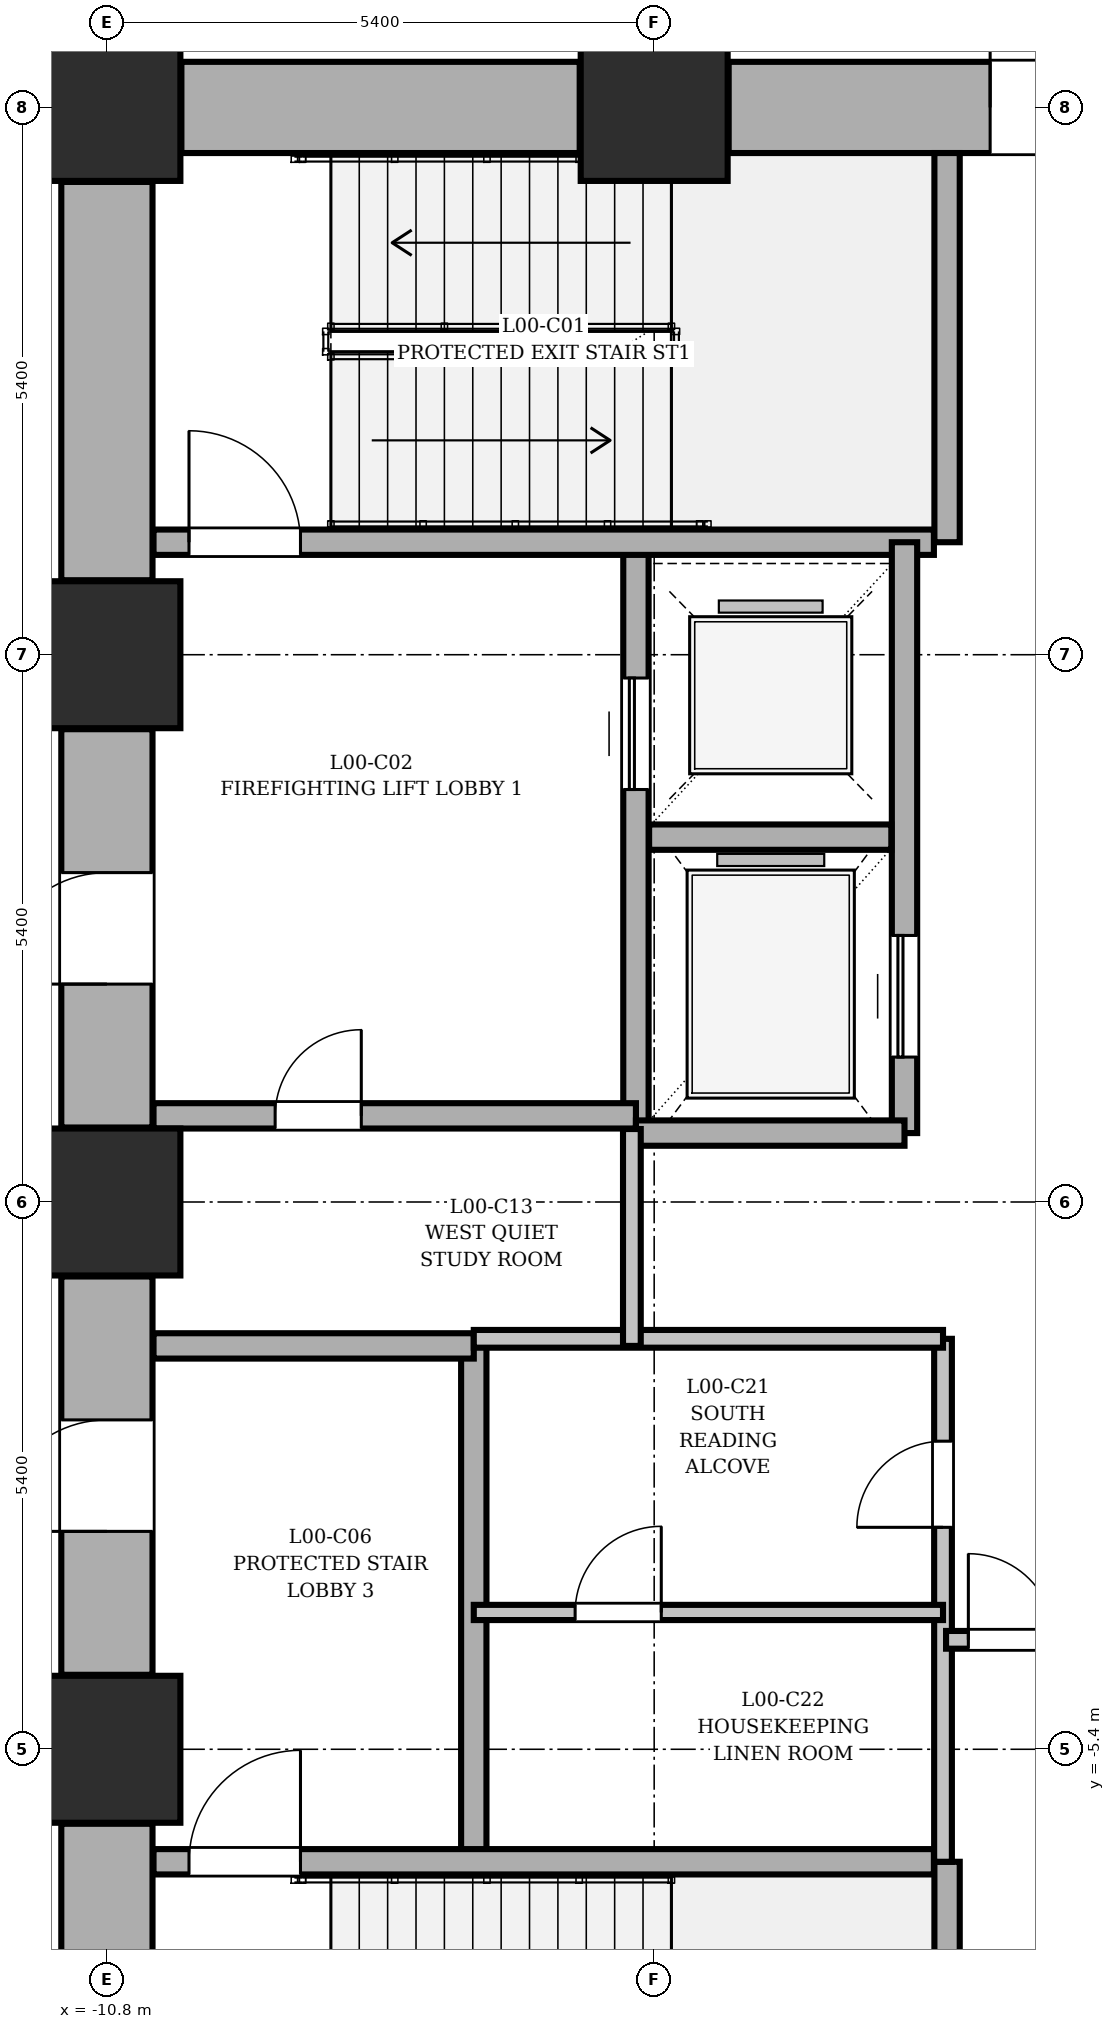
"""IFC4 building model, lengths in metres.
Left out: names, types, materials, properties, quantities, classifications, styles, units other than length and angle.
Written with IfcOpenShell. Run it as: python <this file> out.ifc"""

import sys

from ifc_helpers import new_model, si_unit, direction, frame, frame_2d, origin, origin_2d, place, context, subcontext, project, spatial, rectangle, extrude, element, fill, save


model = new_model("IFC4")
c1 = context("Model", 3, precision=1e-05, world=origin(), true_north=direction((0.0, 1.0)))
c2 = subcontext(c1, "Body", "Model", "MODEL_VIEW")
j1 = project(units=[si_unit("LENGTHUNIT", "METRE"), si_unit("PLANEANGLEUNIT", "RADIAN")], contexts=[c1])
p1 = place(None, origin())
s1 = spatial("IfcSite", under=j1, at=p1, CompositionType="ELEMENT")
p2 = place(p1, origin())
s2 = spatial("IfcBuilding", under=s1, at=p2, CompositionType="ELEMENT")
p3 = place(p2, origin())
s3 = spatial("IfcBuildingStorey", under=s2, at=p3, CompositionType="ELEMENT", Elevation=0.0)
for number, where, z_axis, x_axis in (
    (1, (-10.8, -5.4, 0.0), (0.0, 0.0, 1.0), (1.0, 0.0, 0.0)),
    (2, (-10.8, 0.0, 0.0), (0.0, 0.0, 1.0), (1.0, 0.0, 0.0)),
    (3, (-10.8, 5.4, 0.0), (0.0, 0.0, 1.0), (1.0, 0.0, 0.0)),
    (4, (-10.8, 10.8, 0.0), (0.0, 0.0, 1.0), (1.0, 0.0, 0.0)),
    (5, (-5.4, 10.8, 0.0), (0.0, 0.0, 1.0), (1.0, 0.0, 0.0)),
):
    element("IfcColumn", number, at=place(p3, frame(where, z_axis=z_axis, x_axis=x_axis)), inside=s3, PredefinedType="COLUMN", context=c2, shape_type="SweptSolid", body=[
        extrude(rectangle(XDim=1.45, YDim=1.45, at=origin_2d()), origin(), (0.0, 0.0, 1.0), 4.5),
    ])
for number, where, z_axis, x_axis in (
    (6, (-10.065, 10.8, 0.0), (0.0, 0.0, 1.0), (1.0, 0.0, 0.0)),
    (7, (-10.8, -10.065, 0.0), (0.0, 0.0, 1.0), (0.0, 1.0, 0.0)),
):
    element("IfcWall", number, at=place(p3, frame(where, z_axis=z_axis, x_axis=x_axis)), inside=s3, PredefinedType="SHEAR", context=c2, shape_type="SweptSolid", body=[
        extrude(rectangle(XDim=3.93, YDim=0.9, at=frame_2d((1.965, 0.0))), origin(), (0.0, 0.0, 1.0), 4.5),
    ])
p4 = place(p3, frame((-4.665, 10.8, 0.0), z_axis=(0.0, 0.0, 1.0), x_axis=(1.0, 0.0, 0.0)))
e8 = element("IfcWall", 8, at=p4, inside=s3, PredefinedType="SHEAR", context=c2, shape_type="SweptSolid", body=[
    extrude(rectangle(XDim=3.93, YDim=0.9, at=frame_2d((1.965, 0.0))), origin(), (0.0, 0.0, 1.0), 4.5),
])
p5 = place(p4, frame((2.58, 0.0, 0.0)))
e9 = element("IfcOpeningElement", 9, at=p5, cuts=e8, PredefinedType="OPENING", context=c2, shape_type="SweptSolid", body=[
    extrude(rectangle(XDim=1.1, YDim=2.1, at=frame_2d((0.55, 1.05))), frame((0.0, 0.46, 0.0), z_axis=(0.0, -1.0, 0.0), x_axis=(1.0, 0.0, 0.0)), (0.0, 0.0, 1.0), 0.92),
])
p6 = place(p3, frame((-10.8, -4.665, 0.0), z_axis=(0.0, 0.0, 1.0), x_axis=(0.0, 1.0, 0.0)))
e10 = element("IfcWall", 10, at=p6, inside=s3, PredefinedType="SHEAR", context=c2, shape_type="SweptSolid", body=[
    extrude(rectangle(XDim=3.93, YDim=0.9, at=frame_2d((1.965, 0.0))), origin(), (0.0, 0.0, 1.0), 4.5),
])
p7 = place(p6, frame((1.415, 0.0, 0.0)))
e11 = element("IfcOpeningElement", 11, at=p7, cuts=e10, PredefinedType="OPENING", context=c2, shape_type="SweptSolid", body=[
    extrude(rectangle(XDim=1.1, YDim=2.1, at=frame_2d((0.55, 1.05))), frame((0.0, 0.46, 0.0), z_axis=(0.0, -1.0, 0.0), x_axis=(1.0, 0.0, 0.0)), (0.0, 0.0, 1.0), 0.92),
])
p8 = place(p3, frame((-10.8, 0.735, 0.0), z_axis=(0.0, 0.0, 1.0), x_axis=(0.0, 1.0, 0.0)))
e12 = element("IfcWall", 12, at=p8, inside=s3, PredefinedType="SHEAR", context=c2, shape_type="SweptSolid", body=[
    extrude(rectangle(XDim=3.93, YDim=0.9, at=frame_2d((1.965, 0.0))), origin(), (0.0, 0.0, 1.0), 4.5),
])
p9 = place(p8, frame((1.415, 0.0, 0.0)))
e13 = element("IfcOpeningElement", 13, at=p9, cuts=e12, PredefinedType="OPENING", context=c2, shape_type="SweptSolid", body=[
    extrude(rectangle(XDim=1.1, YDim=2.1, at=frame_2d((0.55, 1.05))), frame((0.0, 0.46, 0.0), z_axis=(0.0, -1.0, 0.0), x_axis=(1.0, 0.0, 0.0)), (0.0, 0.0, 1.0), 0.92),
])
p10 = place(p3, frame((-10.8, 6.135, 0.0), z_axis=(0.0, 0.0, 1.0), x_axis=(0.0, 1.0, 0.0)))
e14 = element("IfcWall", 14, at=p10, inside=s3, PredefinedType="SHEAR", context=c2, shape_type="SweptSolid", body=[
    extrude(rectangle(XDim=3.93, YDim=0.9, at=frame_2d((1.965, 0.0))), origin(), (0.0, 0.0, 1.0), 4.5),
])
p11 = place(p3, frame((-5.58, 0.72, 0.0), z_axis=(0.0, 0.0, 1.0), x_axis=(0.0, 1.0, 0.0)))
e15 = element("IfcWall", 15, at=p11, inside=s3, PredefinedType="SHEAR", context=c2, shape_type="SweptSolid", body=[
    extrude(rectangle(XDim=5.79, YDim=0.25, at=frame_2d((2.895, 0.0))), origin(), (0.0, 0.0, 1.0), 4.5),
])
p12 = place(p11, frame((3.35, 0.0, 0.0)))
e16 = element("IfcOpeningElement", 16, at=p12, cuts=e15, PredefinedType="OPENING", context=c2, shape_type="SweptSolid", body=[
    extrude(rectangle(XDim=1.1, YDim=2.1, at=frame_2d((0.55, 1.05))), frame((0.0, 0.135, 0.0), z_axis=(0.0, -1.0, 0.0), x_axis=(1.0, 0.0, 0.0)), (0.0, 0.0, 1.0), 0.27),
])
p13 = place(p3, frame((-10.34, 0.85, 0.0), z_axis=(0.0, 0.0, 1.0), x_axis=(1.0, 0.0, 0.0)))
e17 = element("IfcWall", 17, at=p13, inside=s3, PredefinedType="SHEAR", context=c2, shape_type="SweptSolid", body=[
    extrude(rectangle(XDim=4.76, YDim=0.25, at=frame_2d((2.38, 0.0))), origin(), (0.0, 0.0, 1.0), 4.5),
])
p14 = place(p13, frame((1.2, 0.0, 0.0)))
e18 = element("IfcOpeningElement", 18, at=p14, cuts=e17, PredefinedType="OPENING", context=c2, shape_type="SweptSolid", body=[
    extrude(rectangle(XDim=0.85, YDim=2.1, at=frame_2d((0.425, 1.05))), frame((0.0, 0.135, 0.0), z_axis=(0.0, -1.0, 0.0), x_axis=(1.0, 0.0, 0.0)), (0.0, 0.0, 1.0), 0.27),
])
p15 = place(p3, frame((-2.51, 6.51, 0.0), z_axis=(0.0, 0.0, 1.0), x_axis=(0.0, 1.0, 0.0)))
e19 = element("IfcWall", 19, at=p15, inside=s3, PredefinedType="SHEAR", context=c2, shape_type="SweptSolid", body=[
    extrude(rectangle(XDim=3.84, YDim=0.25, at=frame_2d((1.92, 0.0))), origin(), (0.0, 0.0, 1.0), 4.5),
])
p16 = place(p3, frame((-10.34, 6.51, 0.0), z_axis=(0.0, 0.0, 1.0), x_axis=(1.0, 0.0, 0.0)))
e20 = element("IfcWall", 20, at=p16, inside=s3, PredefinedType="SHEAR", context=c2, shape_type="SweptSolid", body=[
    extrude(rectangle(XDim=7.7, YDim=0.25, at=frame_2d((3.85, 0.0))), origin(), (0.0, 0.0, 1.0), 4.5),
])
p17 = place(p16, frame((0.35, 0.0, 0.0)))
e21 = element("IfcOpeningElement", 21, at=p17, cuts=e20, PredefinedType="OPENING", context=c2, shape_type="SweptSolid", body=[
    extrude(rectangle(XDim=1.1, YDim=2.1, at=frame_2d((0.55, 1.05))), frame((0.0, 0.135, 0.0), z_axis=(0.0, -1.0, 0.0), x_axis=(1.0, 0.0, 0.0)), (0.0, 0.0, 1.0), 0.27),
])
p18 = place(p3, frame((-2.51, -10.35, 0.0), z_axis=(0.0, 0.0, 1.0), x_axis=(0.0, 1.0, 0.0)))
e22 = element("IfcWall", 22, at=p18, inside=s3, PredefinedType="SHEAR", context=c2, shape_type="SweptSolid", body=[
    extrude(rectangle(XDim=3.84, YDim=0.25, at=frame_2d((1.92, 0.0))), origin(), (0.0, 0.0, 1.0), 4.5),
])
p19 = place(p3, frame((-7.18, -6.51, 0.0), z_axis=(0.0, 0.0, 1.0), x_axis=(0.0, 1.0, 0.0)))
e23 = element("IfcWall", 23, at=p19, inside=s3, PredefinedType="SHEAR", context=c2, shape_type="SweptSolid", body=[
    extrude(rectangle(XDim=5.09, YDim=0.25, at=frame_2d((2.545, 0.0))), origin(), (0.0, 0.0, 1.0), 4.5),
])
p20 = place(p3, frame((-10.34, -1.42, 0.0), z_axis=(0.0, 0.0, 1.0), x_axis=(1.0, 0.0, 0.0)))
e24 = element("IfcWall", 24, at=p20, inside=s3, PredefinedType="SHEAR", context=c2, shape_type="SweptSolid", body=[
    extrude(rectangle(XDim=3.16, YDim=0.25, at=frame_2d((1.58, 0.0))), origin(), (0.0, 0.0, 1.0), 4.5),
])
p21 = place(p3, frame((-10.34, -6.51, 0.0), z_axis=(0.0, 0.0, 1.0), x_axis=(1.0, 0.0, 0.0)))
e25 = element("IfcWall", 25, at=p21, inside=s3, PredefinedType="SHEAR", context=c2, shape_type="SweptSolid", body=[
    extrude(rectangle(XDim=7.7, YDim=0.25, at=frame_2d((3.85, 0.0))), origin(), (0.0, 0.0, 1.0), 4.5),
])
p22 = place(p21, frame((0.35, 0.0, 0.0)))
e26 = element("IfcOpeningElement", 26, at=p22, cuts=e25, PredefinedType="OPENING", context=c2, shape_type="SweptSolid", body=[
    extrude(rectangle(XDim=1.1, YDim=2.1, at=frame_2d((0.55, 1.05))), frame((0.0, 0.135, 0.0), z_axis=(0.0, -1.0, 0.0), x_axis=(1.0, 0.0, 0.0)), (0.0, 0.0, 1.0), 0.27),
])
p23 = place(p3, frame((-2.93, 0.68, 0.0), z_axis=(0.0, 0.0, 1.0), x_axis=(0.0, 1.0, 0.0)))
e27 = element("IfcWall", 27, at=p23, inside=s3, PredefinedType="SHEAR", context=c2, shape_type="SweptSolid", body=[
    extrude(rectangle(XDim=5.83, YDim=0.25, at=frame_2d((2.915, 0.0))), origin(), (0.0, 0.0, 1.0), 4.5),
])
p24 = place(p23, frame((0.75, 0.0, 0.0)))
e28 = element("IfcOpeningElement", 28, at=p24, cuts=e27, PredefinedType="OPENING", context=c2, shape_type="SweptSolid", body=[
    extrude(rectangle(XDim=1.2, YDim=2.1, at=frame_2d((0.6, 1.05))), frame((0.0, 0.135, 0.0), z_axis=(0.0, -1.0, 0.0), x_axis=(1.0, 0.0, 0.0)), (0.0, 0.0, 1.0), 0.27),
])
p25 = place(p3, frame((-5.45, 3.6, 0.0), z_axis=(0.0, 0.0, 1.0), x_axis=(1.0, 0.0, 0.0)))
e29 = element("IfcWall", 29, at=p25, inside=s3, PredefinedType="SHEAR", context=c2, shape_type="SweptSolid", body=[
    extrude(rectangle(XDim=2.39, YDim=0.25, at=frame_2d((1.195, 0.0))), origin(), (0.0, 0.0, 1.0), 4.5),
])
p26 = place(p3, frame((-5.58, 0.68, 0.0), z_axis=(0.0, 0.0, 1.0), x_axis=(1.0, 0.0, 0.0)))
e30 = element("IfcWall", 30, at=p26, inside=s3, PredefinedType="SHEAR", context=c2, shape_type="SweptSolid", body=[
    extrude(rectangle(XDim=2.65, YDim=0.25, at=frame_2d((1.325, 0.0))), origin(), (0.0, 0.0, 1.0), 4.5),
])
p27 = place(p3, frame((-2.55, -6.51, 0.0), z_axis=(0.0, 0.0, 1.0), x_axis=(0.0, 1.0, 0.0)))
e31 = element("IfcWall", 31, at=p27, inside=s3, PredefinedType="PARTITIONING", context=c2, shape_type="SweptSolid", body=[
    extrude(rectangle(XDim=5.16, YDim=0.175, at=frame_2d((2.58, 0.0))), origin(), (0.0, 0.0, 1.0), 4.2),
])
p28 = place(p27, frame((3.3, 0.0, 0.0)))
e32 = element("IfcOpeningElement", 32, at=p28, cuts=e31, PredefinedType="OPENING", context=c2, shape_type="SweptSolid", body=[
    extrude(rectangle(XDim=0.85, YDim=2.1, at=frame_2d((0.425, 1.05))), frame((0.0, 0.097, 0.0), z_axis=(0.0, -1.0, 0.0), x_axis=(1.0, 0.0, 0.0)), (0.0, 0.0, 1.0), 0.195),
])
p29 = place(p3, frame((-7.18, -4.05, 0.0), z_axis=(0.0, 0.0, 1.0), x_axis=(1.0, 0.0, 0.0)))
e33 = element("IfcWall", 33, at=p29, inside=s3, PredefinedType="PARTITIONING", context=c2, shape_type="SweptSolid", body=[
    extrude(rectangle(XDim=4.63, YDim=0.15, at=frame_2d((2.315, 0.0))), origin(), (0.0, 0.0, 1.0), 4.2),
])
p30 = place(p29, frame((1.0, 0.0, 0.0)))
e34 = element("IfcOpeningElement", 34, at=p30, cuts=e33, PredefinedType="OPENING", context=c2, shape_type="SweptSolid", body=[
    extrude(rectangle(XDim=0.85, YDim=2.1, at=frame_2d((0.425, 1.05))), frame((0.0, 0.085, 0.0), z_axis=(0.0, -1.0, 0.0), x_axis=(1.0, 0.0, 0.0)), (0.0, 0.0, 1.0), 0.17),
])
p31 = place(p3, frame((-7.18, -1.35, 0.0), z_axis=(0.0, 0.0, 1.0), x_axis=(1.0, 0.0, 0.0)))
e35 = element("IfcWall", 35, at=p31, inside=s3, PredefinedType="PARTITIONING", context=c2, shape_type="SweptSolid", body=[
    extrude(rectangle(XDim=4.63, YDim=0.175, at=frame_2d((2.315, 0.0))), origin(), (0.0, 0.0, 1.0), 4.2),
])
p32 = place(p3, frame((-5.62, -1.42, 0.0), z_axis=(0.0, 0.0, 1.0), x_axis=(0.0, 1.0, 0.0)))
e36 = element("IfcWall", 36, at=p32, inside=s3, PredefinedType="PARTITIONING", context=c2, shape_type="SweptSolid", body=[
    extrude(rectangle(XDim=2.14, YDim=0.175, at=frame_2d((1.07, 0.0))), origin(), (0.0, 0.0, 1.0), 4.2),
])
p33 = place(p3, frame((-2.52, -4.32, 0.0), z_axis=(0.0, 0.0, 1.0), x_axis=(1.0, 0.0, 0.0)))
e37 = element("IfcWall", 37, at=p33, inside=s3, PredefinedType="PARTITIONING", context=c2, shape_type="SweptSolid", body=[
    extrude(rectangle(XDim=1.3, YDim=0.175, at=frame_2d((0.65, 0.0))), origin(), (0.0, 0.0, 1.0), 4.2),
])
p34 = place(p33, frame((0.22, 0.0, 0.0)))
e38 = element("IfcOpeningElement", 38, at=p34, cuts=e37, PredefinedType="OPENING", context=c2, shape_type="SweptSolid", body=[
    extrude(rectangle(XDim=0.85, YDim=2.1, at=frame_2d((0.425, 1.05))), frame((0.0, 0.097, 0.0), z_axis=(0.0, -1.0, 0.0), x_axis=(1.0, 0.0, 0.0)), (0.0, 0.0, 1.0), 0.195),
])
p35 = place(p3, frame((-21.56, -5.9, 0.0), z_axis=(0.0, 0.0, 1.0), x_axis=(1.0, 0.0, 0.0)))
e39 = element("IfcWall", 39, at=p35, inside=s3, PredefinedType="PARTITIONING", context=c2, shape_type="SweptSolid", body=[
    extrude(rectangle(XDim=10.71, YDim=0.2, at=frame_2d((5.355, 0.0))), origin(), (0.0, 0.0, 1.0), 3.329),
])
p36 = place(p35, frame((7.36, 0.0, 0.0)))
e40 = element("IfcOpeningElement", 40, at=p36, cuts=e39, PredefinedType="OPENING", context=c2, shape_type="SweptSolid", body=[
    extrude(rectangle(XDim=1.1, YDim=2.1, at=frame_2d((0.55, 1.05))), frame((0.0, 0.11, 0.0), z_axis=(0.0, -1.0, 0.0), x_axis=(1.0, 0.0, 0.0)), (0.0, 0.0, 1.0), 0.22),
])
p37 = place(p17, origin())
e41 = element("IfcDoor", 41, at=p37, inside=s3, OperationType="SINGLE_SWING_LEFT", PredefinedType="DOOR", context=c2, shape_type="SweptSolid", body=[
    extrude(rectangle(XDim=1.1, YDim=2.1, at=frame_2d((0.55, 1.05))), frame((0.0, 0.025, 0.0), z_axis=(0.0, -1.0, 0.0), x_axis=(1.0, 0.0, 0.0)), (0.0, 0.0, 1.0), 0.05),
])
fill(e21, e41)
p38 = place(p22, origin())
e42 = element("IfcDoor", 42, at=p38, inside=s3, OperationType="SINGLE_SWING_RIGHT", PredefinedType="DOOR", context=c2, shape_type="SweptSolid", body=[
    extrude(rectangle(XDim=1.1, YDim=2.1, at=frame_2d((0.55, 1.05))), frame((0.0, 0.025, 0.0), z_axis=(0.0, -1.0, 0.0), x_axis=(1.0, 0.0, 0.0)), (0.0, 0.0, 1.0), 0.05),
])
fill(e26, e42)
p39 = place(p5, origin())
e43 = element("IfcDoor", 43, at=p39, inside=s3, OperationType="SINGLE_SWING_LEFT", PredefinedType="DOOR", context=c2, shape_type="SweptSolid", body=[
    extrude(rectangle(XDim=1.1, YDim=2.1, at=frame_2d((0.55, 1.05))), frame((0.0, 0.025, 0.0), z_axis=(0.0, -1.0, 0.0), x_axis=(1.0, 0.0, 0.0)), (0.0, 0.0, 1.0), 0.05),
])
fill(e9, e43)
p40 = place(p9, origin())
e44 = element("IfcDoor", 44, at=p40, inside=s3, OperationType="SINGLE_SWING_LEFT", PredefinedType="DOOR", context=c2, shape_type="SweptSolid", body=[
    extrude(rectangle(XDim=1.1, YDim=2.1, at=frame_2d((0.55, 1.05))), frame((0.0, 0.025, 0.0), z_axis=(0.0, -1.0, 0.0), x_axis=(1.0, 0.0, 0.0)), (0.0, 0.0, 1.0), 0.05),
])
fill(e13, e44)
p41 = place(p7, origin())
e45 = element("IfcDoor", 45, at=p41, inside=s3, OperationType="SINGLE_SWING_LEFT", PredefinedType="DOOR", context=c2, shape_type="SweptSolid", body=[
    extrude(rectangle(XDim=1.1, YDim=2.1, at=frame_2d((0.55, 1.05))), frame((0.0, 0.025, 0.0), z_axis=(0.0, -1.0, 0.0), x_axis=(1.0, 0.0, 0.0)), (0.0, 0.0, 1.0), 0.05),
])
fill(e11, e45)
p42 = place(p14, origin())
e46 = element("IfcDoor", 46, at=p42, inside=s3, OperationType="SINGLE_SWING_RIGHT", PredefinedType="DOOR", context=c2, shape_type="SweptSolid", body=[
    extrude(rectangle(XDim=0.85, YDim=2.1, at=frame_2d((0.425, 1.05))), frame((0.0, 0.025, 0.0), z_axis=(0.0, -1.0, 0.0), x_axis=(1.0, 0.0, 0.0)), (0.0, 0.0, 1.0), 0.05),
])
fill(e18, e46)
p43 = place(p12, origin())
e47 = element("IfcDoor", 47, at=p43, inside=s3, OperationType="SLIDING_TO_LEFT", PredefinedType="DOOR", context=c2, shape_type="SweptSolid", body=[
    extrude(rectangle(XDim=1.1, YDim=2.1, at=frame_2d((0.55, 1.05))), frame((0.0, 0.025, 0.0), z_axis=(0.0, -1.0, 0.0), x_axis=(1.0, 0.0, 0.0)), (0.0, 0.0, 1.0), 0.05),
])
fill(e16, e47)
p44 = place(p24, origin())
e48 = element("IfcDoor", 48, at=p44, inside=s3, OperationType="SLIDING_TO_LEFT", PredefinedType="DOOR", context=c2, shape_type="SweptSolid", body=[
    extrude(rectangle(XDim=1.2, YDim=2.1, at=frame_2d((0.6, 1.05))), frame((0.0, 0.025, 0.0), z_axis=(0.0, -1.0, 0.0), x_axis=(1.0, 0.0, 0.0)), (0.0, 0.0, 1.0), 0.05),
])
fill(e28, e48)
p45 = place(p34, origin())
e49 = element("IfcDoor", 49, at=p45, inside=s3, OperationType="SINGLE_SWING_LEFT", PredefinedType="DOOR", context=c2, shape_type="SweptSolid", body=[
    extrude(rectangle(XDim=0.85, YDim=2.1, at=frame_2d((0.425, 1.05))), frame((0.0, 0.025, 0.0), z_axis=(0.0, -1.0, 0.0), x_axis=(1.0, 0.0, 0.0)), (0.0, 0.0, 1.0), 0.05),
])
fill(e38, e49)
p46 = place(p28, origin())
e50 = element("IfcDoor", 50, at=p46, inside=s3, OperationType="SINGLE_SWING_LEFT", PredefinedType="DOOR", context=c2, shape_type="SweptSolid", body=[
    extrude(rectangle(XDim=0.85, YDim=2.1, at=frame_2d((0.425, 1.05))), frame((0.0, 0.025, 0.0), z_axis=(0.0, -1.0, 0.0), x_axis=(1.0, 0.0, 0.0)), (0.0, 0.0, 1.0), 0.05),
])
fill(e32, e50)
p47 = place(p30, origin())
e51 = element("IfcDoor", 51, at=p47, inside=s3, OperationType="SINGLE_SWING_RIGHT", PredefinedType="DOOR", context=c2, shape_type="SweptSolid", body=[
    extrude(rectangle(XDim=0.85, YDim=2.1, at=frame_2d((0.425, 1.05))), frame((0.0, 0.025, 0.0), z_axis=(0.0, -1.0, 0.0), x_axis=(1.0, 0.0, 0.0)), (0.0, 0.0, 1.0), 0.05),
])
fill(e34, e51)
save(model, sys.argv[1])
